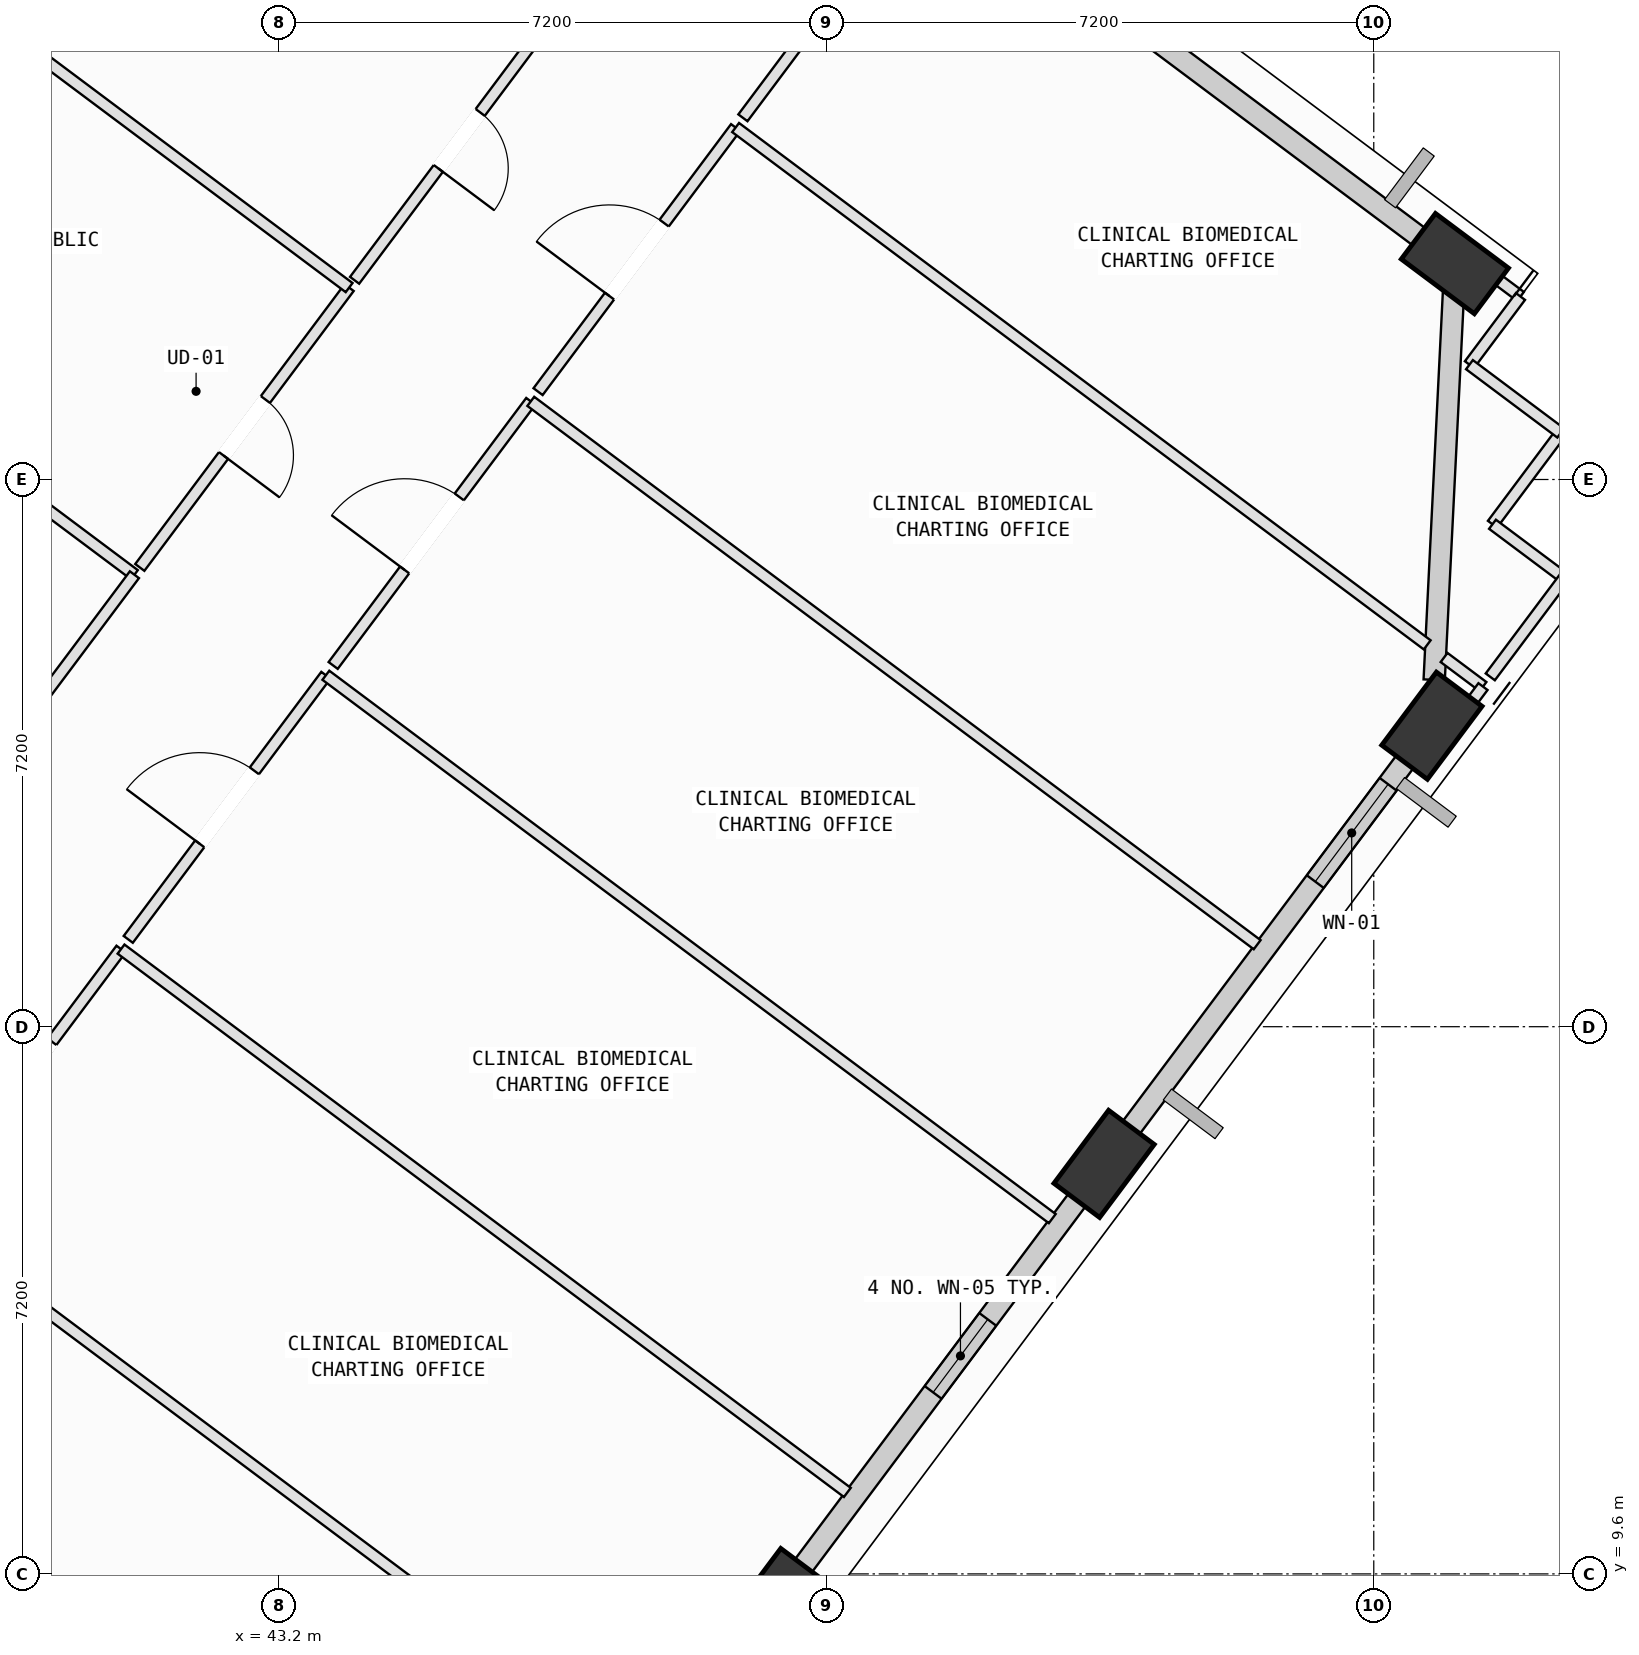
"""IFC4 building model, lengths in metres.
Left out: names, types, materials, properties, quantities, classifications, styles, units other than length and angle.
Written with IfcOpenShell. Run it as: python <this file> out.ifc"""

import sys

from ifc_helpers import new_model, si_unit, direction, frame, frame_2d, origin, origin_2d, place, context, subcontext, project, spatial, rectangle, extrude, element, fill, save


model = new_model("IFC4")
c1 = context("Model", 3, precision=1e-05, world=origin(), true_north=direction((0.0, 1.0)))
c2 = subcontext(c1, "Body", "Model", "MODEL_VIEW")
j1 = project(units=[si_unit("LENGTHUNIT", "METRE"), si_unit("PLANEANGLEUNIT", "RADIAN")], contexts=[c1])
p1 = place(None, origin())
s1 = spatial("IfcSite", under=j1, at=p1, CompositionType="ELEMENT")
p2 = place(p1, origin())
s2 = spatial("IfcBuilding", under=s1, at=p2, CompositionType="ELEMENT")
p3 = place(p2, frame((0.0, 0.0, 251.2)))
s3 = spatial("IfcBuildingStorey", under=s2, at=p3, CompositionType="ELEMENT", Elevation=251.2)
p4 = place(p3, frame((49.739, 9.23, 0.002), z_axis=(0.063748411472, 0.067154815138, 0.995703957428), x_axis=(-0.983362673605, -0.165833326285, 0.074142835491)))
e1 = element("IfcColumn", 1, at=p4, inside=s3, PredefinedType="COLUMN", context=c2, shape_type="SweptSolid", body=[
    extrude(rectangle(XDim=1.2, YDim=0.75, at=origin_2d()), origin(), (0.0, 0.0, 1.0), 4.014),
])
p5 = place(p3, frame((54.052, 14.995, 0.002), z_axis=(0.039778172203, 0.084726290335, 0.995609940058), x_axis=(-0.881040360407, -0.46706603871, 0.074947974075)))
e2 = element("IfcColumn", 2, at=p5, inside=s3, PredefinedType="COLUMN", context=c2, shape_type="SweptSolid", body=[
    extrude(rectangle(XDim=1.2, YDim=0.75, at=origin_2d()), origin(), (0.0, 0.0, 1.0), 4.014),
])
p6 = place(p3, frame((58.365, 20.76, 0.002), z_axis=(0.015798513872, 0.102204232052, 0.994637975301), x_axis=(-0.713659401151, -0.695580870268, 0.082810096407)))
e3 = element("IfcColumn", 3, at=p6, inside=s3, PredefinedType="COLUMN", context=c2, shape_type="SweptSolid", body=[
    extrude(rectangle(XDim=1.2, YDim=0.75, at=origin_2d()), origin(), (0.0, 0.0, 1.0), 4.018),
])
p7 = place(p3, frame((58.667, 26.841, 0.002), z_axis=(-0.009235832937, 0.103234737891, 0.994614140399), x_axis=(0.850636606245, -0.522075248116, 0.062087031016)))
e4 = element("IfcColumn", 4, at=p7, inside=s3, PredefinedType="COLUMN", context=c2, shape_type="SweptSolid", body=[
    extrude(rectangle(XDim=1.2, YDim=0.75, at=origin_2d()), origin(), (0.0, 0.0, 1.0), 4.018),
])
p8 = place(p3, frame((53.925, 14.825, 0.0), z_axis=(0.0, 0.0, 1.0), x_axis=(-0.599030136661, -0.800726479749, 0.0)))
e5 = element("IfcWall", 5, at=p8, inside=s3, PredefinedType="SOLIDWALL", context=c2, shape_type="SweptSolid", body=[
    extrude(rectangle(XDim=6.407, YDim=0.28, at=frame_2d((3.203, 0.0))), origin(), (0.0, 0.0, 1.0), 3.265),
])
p9 = place(p8, frame((2.344, 0.0, 0.75)))
e6 = element("IfcOpeningElement", 6, at=p9, cuts=e5, PredefinedType="OPENING", context=c2, shape_type="SweptSolid", body=[
    extrude(rectangle(XDim=1.2, YDim=1.75, at=frame_2d((0.6, 0.875))), frame((0.0, 0.15, 0.0), z_axis=(0.0, -1.0, 0.0), x_axis=(1.0, 0.0, 0.0)), (0.0, 0.0, 1.0), 0.3),
])
p10 = place(p3, frame((58.244, 20.599, 0.0), z_axis=(0.0, 0.0, 1.0), x_axis=(-0.599019695529, -0.800734290741, 0.0)))
e7 = element("IfcWall", 7, at=p10, inside=s3, PredefinedType="SOLIDWALL", context=c2, shape_type="SweptSolid", body=[
    extrude(rectangle(XDim=6.418, YDim=0.28, at=frame_2d((3.209, 0.0))), origin(), (0.0, 0.0, 1.0), 3.265),
])
p11 = place(p10, frame((0.76, 0.0, 0.75)))
e8 = element("IfcOpeningElement", 8, at=p11, cuts=e7, PredefinedType="OPENING", context=c2, shape_type="SweptSolid", body=[
    extrude(rectangle(XDim=1.6, YDim=1.95, at=frame_2d((0.8, 0.975))), frame((0.0, 0.15, 0.0), z_axis=(0.0, -1.0, 0.0), x_axis=(1.0, 0.0, 0.0)), (0.0, 0.0, 1.0), 0.3),
])
p12 = place(p3, frame((58.658, 26.651, 0.0), z_axis=(0.0, 0.0, 1.0), x_axis=(-0.049712214563, -0.998763583499, 0.0)))
e9 = element("IfcWall", 9, at=p12, inside=s3, PredefinedType="SOLIDWALL", context=c2, shape_type="SweptSolid", body=[
    extrude(rectangle(XDim=5.294, YDim=0.28, at=frame_2d((2.647, 0.0))), origin(), (0.0, 0.0, 1.0), 3.265),
])
p13 = place(p3, frame((52.621, 31.364, 0.0), z_axis=(0.0, 0.0, 1.0), x_axis=(0.800735308346, -0.599018335252, 0.0)))
e10 = element("IfcWall", 10, at=p13, inside=s3, PredefinedType="SOLIDWALL", context=c2, shape_type="SweptSolid", body=[
    extrude(rectangle(XDim=7.046, YDim=0.28, at=frame_2d((3.523, 0.0))), origin(), (0.0, 0.0, 1.0), 3.265),
])
p14 = place(p3, frame((36.15, 10.547, 0.0), z_axis=(0.0, 0.0, 1.0), x_axis=(0.800750249999, -0.598998361539, 0.0)))
e11 = element("IfcWall", 11, at=p14, inside=s3, PredefinedType="PARTITIONING", context=c2, shape_type="SweptSolid", body=[
    extrude(rectangle(XDim=11.9, YDim=0.15, at=frame_2d((5.95, 0.0))), origin(), (0.0, 0.0, 1.0), 3.165),
])
p15 = place(p14, frame((5.52, 0.0, 0.0)))
e12 = element("IfcOpeningElement", 12, at=p15, cuts=e11, PredefinedType="OPENING", context=c2, shape_type="SweptSolid", body=[
    extrude(rectangle(XDim=0.86, YDim=2.06, at=frame_2d((0.43, 1.03))), frame((0.0, 0.085, 0.0), z_axis=(0.0, -1.0, 0.0), x_axis=(1.0, 0.0, 0.0)), (0.0, 0.0, 1.0), 0.17),
])
p16 = place(p3, frame((38.482, 14.298, 0.0), z_axis=(0.0, 0.0, 1.0), x_axis=(0.800750498609, -0.598998029193, 0.0)))
e13 = element("IfcWall", 13, at=p16, inside=s3, PredefinedType="PARTITIONING", context=c2, shape_type="SweptSolid", body=[
    extrude(rectangle(XDim=11.935, YDim=0.15, at=frame_2d((5.968, 0.0))), origin(), (0.0, 0.0, 1.0), 3.78),
])
p17 = place(p3, frame((38.578, 14.426, 0.0), z_axis=(0.0, 0.0, 1.0), x_axis=(0.599059884296, 0.800704224435, 0.0)))
e14 = element("IfcWall", 14, at=p17, inside=s3, PredefinedType="PARTITIONING", context=c2, shape_type="SweptSolid", body=[
    extrude(rectangle(XDim=4.24, YDim=0.15, at=frame_2d((2.12, 0.0))), origin(), (0.0, 0.0, 1.0), 3.78),
])
p18 = place(p17, frame((1.52, 0.0, 0.0)))
e15 = element("IfcOpeningElement", 15, at=p18, cuts=e14, PredefinedType="OPENING", context=c2, shape_type="SweptSolid", body=[
    extrude(rectangle(XDim=1.2, YDim=2.15, at=frame_2d((0.6, 1.075))), frame((0.0, 0.085, 0.0), z_axis=(0.0, -1.0, 0.0), x_axis=(1.0, 0.0, 0.0)), (0.0, 0.0, 1.0), 0.17),
])
p19 = place(p3, frame((41.118, 17.821, 0.0), z_axis=(0.0, 0.0, 1.0), x_axis=(0.800730950492, -0.599024160551, 0.0)))
e16 = element("IfcWall", 16, at=p19, inside=s3, PredefinedType="PARTITIONING", context=c2, shape_type="SweptSolid", body=[
    extrude(rectangle(XDim=11.934, YDim=0.15, at=frame_2d((5.967, 0.0))), origin(), (0.0, 0.0, 1.0), 3.78),
])
p20 = place(p3, frame((50.272, 9.557, 0.0), z_axis=(0.0, 0.0, 1.0), x_axis=(-0.6, -0.8, 0.0)))
e17 = element("IfcWall", 17, at=p20, inside=s3, PredefinedType="PARTITIONING", context=c2, shape_type="SweptSolid", body=[
    extrude(rectangle(XDim=0.793, YDim=0.15, at=frame_2d((0.397, 0.0))), origin(), (0.0, 0.0, 1.0), 3.265),
])
p21 = place(p3, frame((41.213, 17.949, 0.0), z_axis=(0.0, 0.0, 1.0), x_axis=(0.599081575716, 0.800687995187, 0.0)))
e18 = element("IfcWall", 18, at=p21, inside=s3, PredefinedType="PARTITIONING", context=c2, shape_type="SweptSolid", body=[
    extrude(rectangle(XDim=4.34, YDim=0.15, at=frame_2d((2.17, 0.0))), origin(), (0.0, 0.0, 1.0), 3.78),
])
p22 = place(p21, frame((1.57, 0.0, 0.0)))
e19 = element("IfcOpeningElement", 19, at=p22, cuts=e18, PredefinedType="OPENING", context=c2, shape_type="SweptSolid", body=[
    extrude(rectangle(XDim=1.2, YDim=2.15, at=frame_2d((0.6, 1.075))), frame((0.0, 0.085, 0.0), z_axis=(0.0, -1.0, 0.0), x_axis=(1.0, 0.0, 0.0)), (0.0, 0.0, 1.0), 0.17),
])
p23 = place(p3, frame((43.813, 21.424, 0.0), z_axis=(0.0, 0.0, 1.0), x_axis=(0.800750498609, -0.598998029193, 0.0)))
e20 = element("IfcWall", 20, at=p23, inside=s3, PredefinedType="PARTITIONING", context=c2, shape_type="SweptSolid", body=[
    extrude(rectangle(XDim=11.935, YDim=0.15, at=frame_2d((5.968, 0.0))), origin(), (0.0, 0.0, 1.0), 3.78),
])
p24 = place(p3, frame((43.909, 21.553, 0.0), z_axis=(0.0, 0.0, 1.0), x_axis=(0.599081575716, 0.800687995187, 0.0)))
e21 = element("IfcWall", 21, at=p24, inside=s3, PredefinedType="PARTITIONING", context=c2, shape_type="SweptSolid", body=[
    extrude(rectangle(XDim=4.34, YDim=0.15, at=frame_2d((2.17, 0.0))), origin(), (0.0, 0.0, 1.0), 3.78),
])
p25 = place(p24, frame((1.57, 0.0, 0.0)))
e22 = element("IfcOpeningElement", 22, at=p25, cuts=e21, PredefinedType="OPENING", context=c2, shape_type="SweptSolid", body=[
    extrude(rectangle(XDim=1.2, YDim=2.15, at=frame_2d((0.6, 1.075))), frame((0.0, 0.085, 0.0), z_axis=(0.0, -1.0, 0.0), x_axis=(1.0, 0.0, 0.0)), (0.0, 0.0, 1.0), 0.17),
])
p26 = place(p3, frame((46.509, 25.028, 0.0), z_axis=(0.0, 0.0, 1.0), x_axis=(0.800743159028, -0.599007840741, 0.0)))
e23 = element("IfcWall", 23, at=p26, inside=s3, PredefinedType="PARTITIONING", context=c2, shape_type="SweptSolid", body=[
    extrude(rectangle(XDim=11.935, YDim=0.15, at=frame_2d((5.968, 0.0))), origin(), (0.0, 0.0, 1.0), 3.78),
])
p27 = place(p3, frame((54.583, 15.322, 0.0), z_axis=(0.0, 0.0, 1.0), x_axis=(-0.598864575718, -0.800850310576, 0.0)))
e24 = element("IfcWall", 24, at=p27, inside=s3, PredefinedType="PARTITIONING", context=c2, shape_type="SweptSolid", body=[
    extrude(rectangle(XDim=0.792, YDim=0.15, at=frame_2d((0.396, 0.0))), origin(), (0.0, 0.0, 1.0), 3.265),
])
p28 = place(p3, frame((46.605, 25.156, 0.0), z_axis=(0.0, 0.0, 1.0), x_axis=(0.598937294168, 0.800795927596, 0.0)))
e25 = element("IfcWall", 25, at=p28, inside=s3, PredefinedType="PARTITIONING", context=c2, shape_type="SweptSolid", body=[
    extrude(rectangle(XDim=4.34, YDim=0.15, at=frame_2d((2.17, 0.0))), origin(), (0.0, 0.0, 1.0), 3.78),
])
p29 = place(p28, frame((1.57, 0.0, 0.0)))
e26 = element("IfcOpeningElement", 26, at=p29, cuts=e25, PredefinedType="OPENING", context=c2, shape_type="SweptSolid", body=[
    extrude(rectangle(XDim=1.2, YDim=2.15, at=frame_2d((0.6, 1.075))), frame((0.0, 0.085, 0.0), z_axis=(0.0, -1.0, 0.0), x_axis=(1.0, 0.0, 0.0)), (0.0, 0.0, 1.0), 0.17),
])
p30 = place(p3, frame((49.204, 28.631, 0.0), z_axis=(0.0, 0.0, 1.0), x_axis=(0.800718737754, -0.599040485284, 0.0)))
e27 = element("IfcWall", 27, at=p30, inside=s3, PredefinedType="PARTITIONING", context=c2, shape_type="SweptSolid", body=[
    extrude(rectangle(XDim=11.363, YDim=0.15, at=frame_2d((5.682, 0.0))), origin(), (0.0, 0.0, 1.0), 3.78),
])
p31 = place(p3, frame((58.525, 21.658, 0.0), z_axis=(0.0, 0.0, 1.0), x_axis=(0.800823734326, -0.598900113993, 0.0)))
e28 = element("IfcWall", 28, at=p31, inside=s3, PredefinedType="PARTITIONING", context=c2, shape_type="SweptSolid", body=[
    extrude(rectangle(XDim=0.64, YDim=0.15, at=frame_2d((0.32, 0.0))), origin(), (0.0, 0.0, 1.0), 3.78),
])
p32 = place(p3, frame((59.037, 21.275, 0.0), z_axis=(0.0, 0.0, 1.0), x_axis=(-0.599154365117, -0.800633528377, 0.0)))
e29 = element("IfcWall", 29, at=p32, inside=s3, PredefinedType="PARTITIONING", context=c2, shape_type="SweptSolid", body=[
    extrude(rectangle(XDim=1.017, YDim=0.15, at=frame_2d((0.508, 0.0))), origin(), (0.0, 0.0, 1.0), 3.265),
])
p33 = place(p3, frame((60.06, 24.612, 0.0), z_axis=(0.0, 0.0, 1.0), x_axis=(-0.598749024632, -0.800936705054, 0.0)))
e30 = element("IfcWall", 30, at=p33, inside=s3, PredefinedType="PARTITIONING", context=c2, shape_type="SweptSolid", body=[
    extrude(rectangle(XDim=1.5, YDim=0.15, at=frame_2d((0.75, 0.0))), origin(), (0.0, 0.0, 1.0), 3.78),
])
p34 = place(p3, frame((59.162, 23.411, 0.0), z_axis=(0.0, 0.0, 1.0), x_axis=(0.80074426189, -0.599006366452, 0.0)))
e31 = element("IfcWall", 31, at=p34, inside=s3, PredefinedType="PARTITIONING", context=c2, shape_type="SweptSolid", body=[
    extrude(rectangle(XDim=1.18, YDim=0.15, at=frame_2d((0.59, 0.0))), origin(), (0.0, 0.0, 1.0), 3.78),
])
p35 = place(p3, frame((60.107, 22.704, 0.0), z_axis=(0.0, 0.0, 1.0), x_axis=(-0.599254614929, -0.800558496605, 0.0)))
e32 = element("IfcWall", 32, at=p35, inside=s3, PredefinedType="PARTITIONING", context=c2, shape_type="SweptSolid", body=[
    extrude(rectangle(XDim=1.625, YDim=0.15, at=frame_2d((0.812, 0.0))), origin(), (0.0, 0.0, 1.0), 3.78),
])
p36 = place(p3, frame((49.3, 28.759, 0.0), z_axis=(0.0, 0.0, 1.0), x_axis=(0.599040287777, 0.800718885515, 0.0)))
e33 = element("IfcWall", 33, at=p36, inside=s3, PredefinedType="PARTITIONING", context=c2, shape_type="SweptSolid", body=[
    extrude(rectangle(XDim=3.828, YDim=0.15, at=frame_2d((1.914, 0.0))), origin(), (0.0, 0.0, 1.0), 3.78),
])
p37 = place(p36, frame((1.314, 0.0, 0.0)))
e34 = element("IfcOpeningElement", 34, at=p37, cuts=e33, PredefinedType="OPENING", context=c2, shape_type="SweptSolid", body=[
    extrude(rectangle(XDim=1.2, YDim=2.15, at=frame_2d((0.6, 1.075))), frame((0.0, 0.085, 0.0), z_axis=(0.0, -1.0, 0.0), x_axis=(1.0, 0.0, 0.0)), (0.0, 0.0, 1.0), 0.17),
])
p38 = place(p3, frame((58.365, 27.28, 0.0), z_axis=(0.0, 0.0, 1.0), x_axis=(0.800563329436, -0.59924815858, 0.0)))
e35 = element("IfcWall", 35, at=p38, inside=s3, PredefinedType="PARTITIONING", context=c2, shape_type="SweptSolid", body=[
    extrude(rectangle(XDim=1.455, YDim=0.15, at=frame_2d((0.728, 0.0))), origin(), (0.0, 0.0, 1.0), 3.265),
])
p39 = place(p3, frame((59.53, 26.408, 0.0), z_axis=(0.0, 0.0, 1.0), x_axis=(-0.599093020706, -0.800679431821, 0.0)))
e36 = element("IfcWall", 36, at=p39, inside=s3, PredefinedType="PARTITIONING", context=c2, shape_type="SweptSolid", body=[
    extrude(rectangle(XDim=1.12, YDim=0.15, at=frame_2d((0.56, 0.0))), origin(), (0.0, 0.0, 1.0), 3.78),
])
p40 = place(p3, frame((58.859, 25.511, 0.0), z_axis=(0.0, 0.0, 1.0), x_axis=(0.800624443757, -0.599166504454, 0.0)))
e37 = element("IfcWall", 37, at=p40, inside=s3, PredefinedType="PARTITIONING", context=c2, shape_type="SweptSolid", body=[
    extrude(rectangle(XDim=1.5, YDim=0.15, at=frame_2d((0.75, 0.0))), origin(), (0.0, 0.0, 1.0), 3.78),
])
p41 = place(p3, frame((36.549, 26.297, 0.0), z_axis=(0.0, 0.0, 1.0), x_axis=(0.800696541922, -0.599070152616, 0.0)))
e38 = element("IfcWall", 38, at=p41, inside=s3, PredefinedType="PARTITIONING", context=c2, shape_type="SweptSolid", body=[
    extrude(rectangle(XDim=5.926, YDim=0.15, at=frame_2d((2.963, 0.0))), origin(), (0.0, 0.0, 1.0), 3.78),
])
p42 = place(p3, frame((41.294, 22.747, 0.0), z_axis=(0.0, 0.0, 1.0), x_axis=(-0.599137256843, -0.800646331074, 0.0)))
e39 = element("IfcWall", 39, at=p42, inside=s3, PredefinedType="PARTITIONING", context=c2, shape_type="SweptSolid", body=[
    extrude(rectangle(XDim=2.582, YDim=0.15, at=frame_2d((1.291, 0.0))), origin(), (0.0, 0.0, 1.0), 3.78),
])
p43 = place(p3, frame((44.119, 26.525, 0.0), z_axis=(0.0, 0.0, 1.0), x_axis=(-0.598954503675, -0.800783055844, 0.0)))
e40 = element("IfcWall", 40, at=p43, inside=s3, PredefinedType="PARTITIONING", context=c2, shape_type="SweptSolid", body=[
    extrude(rectangle(XDim=4.598, YDim=0.15, at=frame_2d((2.299, 0.0))), origin(), (0.0, 0.0, 1.0), 3.78),
])
p44 = place(p43, frame((1.839, 0.0, 0.0)))
e41 = element("IfcOpeningElement", 41, at=p44, cuts=e40, PredefinedType="OPENING", context=c2, shape_type="SweptSolid", body=[
    extrude(rectangle(XDim=0.92, YDim=2.1, at=frame_2d((0.46, 1.05))), frame((0.0, 0.085, 0.0), z_axis=(0.0, -1.0, 0.0), x_axis=(1.0, 0.0, 0.0)), (0.0, 0.0, 1.0), 0.17),
])
p45 = place(p3, frame((38.843, 30.472, 0.0), z_axis=(0.0, 0.0, 1.0), x_axis=(0.800719737782, -0.599039148576, 0.0)))
e42 = element("IfcWall", 42, at=p45, inside=s3, PredefinedType="PARTITIONING", context=c2, shape_type="SweptSolid", body=[
    extrude(rectangle(XDim=6.589, YDim=0.15, at=frame_2d((3.294, 0.0))), origin(), (0.0, 0.0, 1.0), 3.78),
])
p46 = place(p3, frame((46.945, 30.302, 0.0), z_axis=(0.0, 0.0, 1.0), x_axis=(-0.599090435307, -0.80068136629, 0.0)))
e43 = element("IfcWall", 43, at=p46, inside=s3, PredefinedType="PARTITIONING", context=c2, shape_type="SweptSolid", body=[
    extrude(rectangle(XDim=4.597, YDim=0.15, at=frame_2d((2.299, 0.0))), origin(), (0.0, 0.0, 1.0), 3.78),
])
p47 = place(p46, frame((1.839, 0.0, 0.0)))
e44 = element("IfcOpeningElement", 44, at=p47, cuts=e43, PredefinedType="OPENING", context=c2, shape_type="SweptSolid", body=[
    extrude(rectangle(XDim=0.92, YDim=2.1, at=frame_2d((0.46, 1.05))), frame((0.0, 0.085, 0.0), z_axis=(0.0, -1.0, 0.0), x_axis=(1.0, 0.0, 0.0)), (0.0, 0.0, 1.0), 0.17),
])
p48 = place(p9, origin())
e45 = element("IfcWindow", 45, at=p48, inside=s3, PartitioningType="SINGLE_PANEL", PredefinedType="WINDOW", context=c2, shape_type="SweptSolid", body=[
    extrude(rectangle(XDim=1.2, YDim=1.75, at=frame_2d((0.6, 0.875))), frame((0.0, 0.03, 0.0), z_axis=(0.0, -1.0, 0.0), x_axis=(1.0, 0.0, 0.0)), (0.0, 0.0, 1.0), 0.06),
])
fill(e6, e45)
p49 = place(p11, origin())
e46 = element("IfcWindow", 46, at=p49, inside=s3, PartitioningType="SINGLE_PANEL", PredefinedType="WINDOW", context=c2, shape_type="SweptSolid", body=[
    extrude(rectangle(XDim=1.6, YDim=1.95, at=frame_2d((0.8, 0.975))), frame((0.0, 0.03, 0.0), z_axis=(0.0, -1.0, 0.0), x_axis=(1.0, 0.0, 0.0)), (0.0, 0.0, 1.0), 0.06),
])
fill(e8, e46)
p50 = place(p18, origin())
e47 = element("IfcDoor", 47, at=p50, inside=s3, OperationType="SINGLE_SWING_RIGHT", PredefinedType="DOOR", context=c2, shape_type="SweptSolid", body=[
    extrude(rectangle(XDim=1.2, YDim=2.15, at=frame_2d((0.6, 1.075))), frame((0.0, 0.025, 0.0), z_axis=(0.0, -1.0, 0.0), x_axis=(1.0, 0.0, 0.0)), (0.0, 0.0, 1.0), 0.05),
])
fill(e15, e47)
p51 = place(p22, origin())
e48 = element("IfcDoor", 48, at=p51, inside=s3, OperationType="SINGLE_SWING_LEFT", PredefinedType="DOOR", context=c2, shape_type="SweptSolid", body=[
    extrude(rectangle(XDim=1.2, YDim=2.15, at=frame_2d((0.6, 1.075))), frame((0.0, 0.025, 0.0), z_axis=(0.0, -1.0, 0.0), x_axis=(1.0, 0.0, 0.0)), (0.0, 0.0, 1.0), 0.05),
])
fill(e19, e48)
p52 = place(p25, origin())
e49 = element("IfcDoor", 49, at=p52, inside=s3, OperationType="SINGLE_SWING_LEFT", PredefinedType="DOOR", context=c2, shape_type="SweptSolid", body=[
    extrude(rectangle(XDim=1.2, YDim=2.15, at=frame_2d((0.6, 1.075))), frame((0.0, 0.025, 0.0), z_axis=(0.0, -1.0, 0.0), x_axis=(1.0, 0.0, 0.0)), (0.0, 0.0, 1.0), 0.05),
])
fill(e22, e49)
p53 = place(p29, origin())
e50 = element("IfcDoor", 50, at=p53, inside=s3, OperationType="SINGLE_SWING_LEFT", PredefinedType="DOOR", context=c2, shape_type="SweptSolid", body=[
    extrude(rectangle(XDim=1.2, YDim=2.15, at=frame_2d((0.6, 1.075))), frame((0.0, 0.025, 0.0), z_axis=(0.0, -1.0, 0.0), x_axis=(1.0, 0.0, 0.0)), (0.0, 0.0, 1.0), 0.05),
])
fill(e26, e50)
p54 = place(p44, origin())
e51 = element("IfcDoor", 51, at=p54, inside=s3, OperationType="SINGLE_SWING_RIGHT", PredefinedType="DOOR", context=c2, shape_type="SweptSolid", body=[
    extrude(rectangle(XDim=0.92, YDim=2.1, at=frame_2d((0.46, 1.05))), frame((0.0, 0.025, 0.0), z_axis=(0.0, -1.0, 0.0), x_axis=(1.0, 0.0, 0.0)), (0.0, 0.0, 1.0), 0.05),
])
fill(e41, e51)
p55 = place(p47, origin())
e52 = element("IfcDoor", 52, at=p55, inside=s3, OperationType="SINGLE_SWING_RIGHT", PredefinedType="DOOR", context=c2, shape_type="SweptSolid", body=[
    extrude(rectangle(XDim=0.92, YDim=2.1, at=frame_2d((0.46, 1.05))), frame((0.0, 0.025, 0.0), z_axis=(0.0, -1.0, 0.0), x_axis=(1.0, 0.0, 0.0)), (0.0, 0.0, 1.0), 0.05),
])
fill(e44, e52)
save(model, sys.argv[1])
